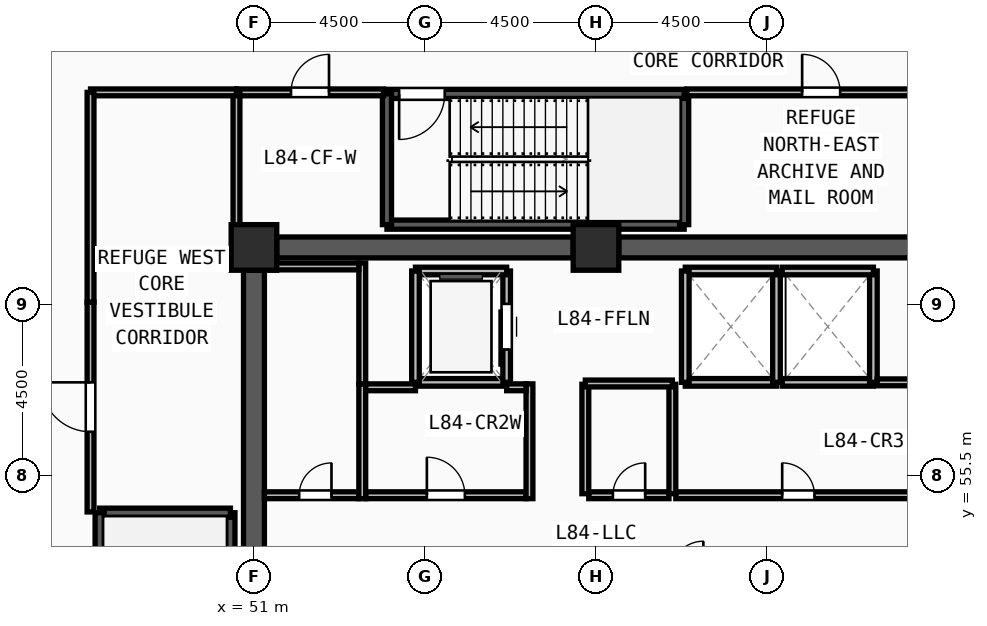
"""IFC4 building model, lengths in metres.
Left out: names, types, materials, properties, quantities, classifications, styles, units other than length and angle.
Written with IfcOpenShell. Run it as: python <this file> out.ifc"""

import sys

from ifc_helpers import new_model, si_unit, direction, frame, frame_2d, origin, origin_2d, place, context, subcontext, project, spatial, rectangle, extrude, source, transform, mapped, element, fill, save


model = new_model("IFC4")
c1 = context("Model", 3, precision=1e-05, world=origin(), true_north=direction((0.0, 1.0)))
c2 = subcontext(c1, "Body", "Model", "MODEL_VIEW")
j1 = project(units=[si_unit("LENGTHUNIT", "METRE"), si_unit("PLANEANGLEUNIT", "RADIAN")], contexts=[c1])
p1 = place(None, origin())
s1 = spatial("IfcSite", under=j1, at=p1, CompositionType="ELEMENT")
p2 = place(p1, origin())
s2 = spatial("IfcBuilding", under=s1, at=p2, CompositionType="ELEMENT")
p3 = place(p2, frame((0.0, 0.0, 324.0)))
s3 = spatial("IfcBuildingStorey", under=s2, at=p3, CompositionType="ELEMENT", Elevation=324.0)
m1 = source(origin(), c2, "Body", "SweptSolid", [
    extrude(rectangle(XDim=1.2, YDim=1.2, at=origin_2d()), origin(), (0.0, 0.0, 1.0), 4.5),
])
for number, where, z_axis, x_axis in (
    (1, (60.0, 61.5, 0.0), (0.0, 0.0, 1.0), (1.0, 0.0, 0.0)),
    (2, (51.0, 61.5, 0.0), (0.0, 0.0, 1.0), (1.0, 0.0, 0.0)),
):
    element("IfcColumn", number, at=place(p3, frame(where, z_axis=z_axis, x_axis=x_axis)), inside=s3, PredefinedType="COLUMN", context=c2, shape_type="MappedRepresentation", body=[
        mapped(m1, transform((0.0, 0.0, 0.0), x_axis=(1.0, 0.0, 0.0), y_axis=(0.0, 1.0, 0.0), z_axis=(0.0, 0.0, 1.0), scale=1.0)),
    ])
for number, where, z_axis, x_axis in (
    (3, (51.6, 61.5, 0.0), (0.0, 0.0, 1.0), (1.0, 0.0, 0.0)),
    (4, (60.6, 61.5, 0.0), (0.0, 0.0, 1.0), (1.0, 0.0, 0.0)),
):
    element("IfcWall", number, at=place(p3, frame(where, z_axis=z_axis, x_axis=x_axis)), inside=s3, PredefinedType="SHEAR", context=c2, shape_type="SweptSolid", body=[
        extrude(rectangle(XDim=7.8, YDim=0.55, at=frame_2d((3.9, 0.0))), origin(), (0.0, 0.0, 1.0), 4.32),
    ])
p4 = place(p3, frame((51.0, 47.1, 0.0), z_axis=(0.0, 0.0, 1.0), x_axis=(0.0, 1.0, 0.0)))
e5 = element("IfcWall", 5, at=p4, inside=s3, PredefinedType="SHEAR", context=c2, shape_type="SweptSolid", body=[
    extrude(rectangle(XDim=13.8, YDim=0.55, at=frame_2d((6.9, 0.0))), origin(), (0.0, 0.0, 1.0), 4.32),
])
p5 = place(p3, frame((50.38, 46.7, 0.0), z_axis=(0.0, 0.0, 1.0), x_axis=(0.0, 1.0, 0.0)))
e6 = element("IfcWall", 6, at=p5, inside=s3, PredefinedType="SOLIDWALL", context=c2, shape_type="SweptSolid", body=[
    extrude(rectangle(XDim=7.82, YDim=0.24, at=frame_2d((3.91, 0.0))), origin(), (0.0, 0.0, 1.0), 4.32),
])
p6 = place(p3, frame((50.38, 54.52, 0.0), z_axis=(0.0, 0.0, 1.0), x_axis=(-1.0, 0.0, 0.0)))
e7 = element("IfcWall", 7, at=p6, inside=s3, PredefinedType="SOLIDWALL", context=c2, shape_type="SweptSolid", body=[
    extrude(rectangle(XDim=3.44, YDim=0.24, at=frame_2d((1.72, 0.0))), origin(), (0.0, 0.0, 1.0), 4.32),
])
p7 = place(p3, frame((46.94, 54.52, 0.0), z_axis=(0.0, 0.0, 1.0), x_axis=(0.0, -1.0, 0.0)))
e8 = element("IfcWall", 8, at=p7, inside=s3, PredefinedType="SOLIDWALL", context=c2, shape_type="SweptSolid", body=[
    extrude(rectangle(XDim=7.82, YDim=0.24, at=frame_2d((3.91, 0.0))), origin(), (0.0, 0.0, 1.0), 4.32),
])
m2 = source(origin(), c2, "Body", "SweptSolid", [
    extrude(rectangle(XDim=1.2, YDim=2.2, at=frame_2d((0.6, 1.1))), frame((0.0, 0.13, 0.0), z_axis=(0.0, -1.0, 0.0), x_axis=(1.0, 0.0, 0.0)), (0.0, 0.0, 1.0), 0.26),
])
p8 = place(p7, frame((6.3, 0.0, 0.0)))
e9 = element("IfcOpeningElement", 9, at=p8, cuts=e8, PredefinedType="OPENING", context=c2, shape_type="MappedRepresentation", body=[
    mapped(m2, transform((0.0, 0.0, 0.0), x_axis=(1.0, 0.0, 0.0), y_axis=(0.0, 1.0, 0.0), z_axis=(0.0, 0.0, 1.0), scale=1.0)),
])
p9 = place(p3, frame((54.5, 62.1, 0.0), z_axis=(0.0, 0.0, 1.0), x_axis=(1.0, 0.0, 0.0)))
e10 = element("IfcWall", 10, at=p9, inside=s3, PredefinedType="SOLIDWALL", context=c2, shape_type="SweptSolid", body=[
    extrude(rectangle(XDim=7.82, YDim=0.24, at=frame_2d((3.91, 0.0))), origin(), (0.0, 0.0, 1.0), 4.32),
])
p10 = place(p3, frame((62.32, 62.1, 0.0), z_axis=(0.0, 0.0, 1.0), x_axis=(0.0, 1.0, 0.0)))
e11 = element("IfcWall", 11, at=p10, inside=s3, PredefinedType="SOLIDWALL", context=c2, shape_type="SweptSolid", body=[
    extrude(rectangle(XDim=3.44, YDim=0.24, at=frame_2d((1.72, 0.0))), origin(), (0.0, 0.0, 1.0), 4.32),
])
p11 = place(p3, frame((62.32, 65.54, 0.0), z_axis=(0.0, 0.0, 1.0), x_axis=(-1.0, 0.0, 0.0)))
e12 = element("IfcWall", 12, at=p11, inside=s3, PredefinedType="SOLIDWALL", context=c2, shape_type="SweptSolid", body=[
    extrude(rectangle(XDim=7.82, YDim=0.24, at=frame_2d((3.91, 0.0))), origin(), (0.0, 0.0, 1.0), 4.32),
])
p12 = place(p11, frame((6.3, 0.0, 0.0)))
e13 = element("IfcOpeningElement", 13, at=p12, cuts=e12, PredefinedType="OPENING", context=c2, shape_type="MappedRepresentation", body=[
    mapped(m2, transform((0.0, 0.0, 0.0), x_axis=(1.0, 0.0, 0.0), y_axis=(0.0, 1.0, 0.0), z_axis=(0.0, 0.0, 1.0), scale=1.0)),
])
p13 = place(p3, frame((54.5, 65.54, 0.0), z_axis=(0.0, 0.0, 1.0), x_axis=(0.0, -1.0, 0.0)))
e14 = element("IfcWall", 14, at=p13, inside=s3, PredefinedType="SOLIDWALL", context=c2, shape_type="SweptSolid", body=[
    extrude(rectangle(XDim=3.44, YDim=0.24, at=frame_2d((1.72, 0.0))), origin(), (0.0, 0.0, 1.0), 4.32),
])
p14 = place(p3, frame((55.25, 57.95, 0.0), z_axis=(0.0, 0.0, 1.0), x_axis=(1.0, 0.0, 0.0)))
e15 = element("IfcWall", 15, at=p14, inside=s3, PredefinedType="SOLIDWALL", context=c2, shape_type="SweptSolid", body=[
    extrude(rectangle(XDim=2.4, YDim=0.2, at=frame_2d((1.2, 0.0))), origin(), (0.0, 0.0, 1.0), 4.32),
])
p15 = place(p3, frame((57.65, 57.95, 0.0), z_axis=(0.0, 0.0, 1.0), x_axis=(0.0, 1.0, 0.0)))
e16 = element("IfcWall", 16, at=p15, inside=s3, PredefinedType="SOLIDWALL", context=c2, shape_type="SweptSolid", body=[
    extrude(rectangle(XDim=2.93, YDim=0.2, at=frame_2d((1.465, 0.0))), origin(), (0.0, 0.0, 1.0), 4.32),
])
m3 = source(origin(), c2, "Body", "SweptSolid", [
    extrude(rectangle(XDim=1.2, YDim=2.3, at=frame_2d((0.6, 1.15))), frame((0.0, 0.11, 0.0), z_axis=(0.0, -1.0, 0.0), x_axis=(1.0, 0.0, 0.0)), (0.0, 0.0, 1.0), 0.22),
])
p16 = place(p15, frame((0.865, 0.0, 0.0)))
e17 = element("IfcOpeningElement", 17, at=p16, cuts=e16, PredefinedType="OPENING", context=c2, shape_type="MappedRepresentation", body=[
    mapped(m3, transform((0.0, 0.0, 0.0), x_axis=(1.0, 0.0, 0.0), y_axis=(0.0, 1.0, 0.0), z_axis=(0.0, 0.0, 1.0), scale=1.0)),
])
p17 = place(p3, frame((57.65, 60.88, 0.0), z_axis=(0.0, 0.0, 1.0), x_axis=(-1.0, 0.0, 0.0)))
e18 = element("IfcWall", 18, at=p17, inside=s3, PredefinedType="SOLIDWALL", context=c2, shape_type="SweptSolid", body=[
    extrude(rectangle(XDim=2.4, YDim=0.2, at=frame_2d((1.2, 0.0))), origin(), (0.0, 0.0, 1.0), 4.32),
])
p18 = place(p3, frame((55.25, 60.88, 0.0), z_axis=(0.0, 0.0, 1.0), x_axis=(0.0, -1.0, 0.0)))
e19 = element("IfcWall", 19, at=p18, inside=s3, PredefinedType="SOLIDWALL", context=c2, shape_type="SweptSolid", body=[
    extrude(rectangle(XDim=2.93, YDim=0.2, at=frame_2d((1.465, 0.0))), origin(), (0.0, 0.0, 1.0), 4.32),
])
p19 = place(p3, frame((62.35, 57.95, 0.0), z_axis=(0.0, 0.0, 1.0), x_axis=(1.0, 0.0, 0.0)))
e20 = element("IfcWall", 20, at=p19, inside=s3, PredefinedType="SOLIDWALL", context=c2, shape_type="SweptSolid", body=[
    extrude(rectangle(XDim=2.4, YDim=0.2, at=frame_2d((1.2, 0.0))), origin(), (0.0, 0.0, 1.0), 4.32),
])
p20 = place(p3, frame((64.75, 57.95, 0.0), z_axis=(0.0, 0.0, 1.0), x_axis=(0.0, 1.0, 0.0)))
e21 = element("IfcWall", 21, at=p20, inside=s3, PredefinedType="SOLIDWALL", context=c2, shape_type="SweptSolid", body=[
    extrude(rectangle(XDim=2.93, YDim=0.2, at=frame_2d((1.465, 0.0))), origin(), (0.0, 0.0, 1.0), 4.32),
])
p21 = place(p3, frame((64.75, 60.88, 0.0), z_axis=(0.0, 0.0, 1.0), x_axis=(-1.0, 0.0, 0.0)))
e22 = element("IfcWall", 22, at=p21, inside=s3, PredefinedType="SOLIDWALL", context=c2, shape_type="SweptSolid", body=[
    extrude(rectangle(XDim=2.4, YDim=0.2, at=frame_2d((1.2, 0.0))), origin(), (0.0, 0.0, 1.0), 4.32),
])
p22 = place(p3, frame((62.35, 60.88, 0.0), z_axis=(0.0, 0.0, 1.0), x_axis=(0.0, -1.0, 0.0)))
e23 = element("IfcWall", 23, at=p22, inside=s3, PredefinedType="SOLIDWALL", context=c2, shape_type="SweptSolid", body=[
    extrude(rectangle(XDim=2.93, YDim=0.2, at=frame_2d((1.465, 0.0))), origin(), (0.0, 0.0, 1.0), 4.32),
])
p23 = place(p3, frame((64.9, 57.95, 0.0), z_axis=(0.0, 0.0, 1.0), x_axis=(1.0, 0.0, 0.0)))
e24 = element("IfcWall", 24, at=p23, inside=s3, PredefinedType="SOLIDWALL", context=c2, shape_type="SweptSolid", body=[
    extrude(rectangle(XDim=2.4, YDim=0.2, at=frame_2d((1.2, 0.0))), origin(), (0.0, 0.0, 1.0), 4.32),
])
p24 = place(p3, frame((67.3, 57.95, 0.0), z_axis=(0.0, 0.0, 1.0), x_axis=(0.0, 1.0, 0.0)))
e25 = element("IfcWall", 25, at=p24, inside=s3, PredefinedType="SOLIDWALL", context=c2, shape_type="SweptSolid", body=[
    extrude(rectangle(XDim=2.93, YDim=0.2, at=frame_2d((1.465, 0.0))), origin(), (0.0, 0.0, 1.0), 4.32),
])
p25 = place(p3, frame((67.3, 60.88, 0.0), z_axis=(0.0, 0.0, 1.0), x_axis=(-1.0, 0.0, 0.0)))
e26 = element("IfcWall", 26, at=p25, inside=s3, PredefinedType="SOLIDWALL", context=c2, shape_type="SweptSolid", body=[
    extrude(rectangle(XDim=2.4, YDim=0.2, at=frame_2d((1.2, 0.0))), origin(), (0.0, 0.0, 1.0), 4.32),
])
p26 = place(p3, frame((53.94, 54.98, 0.0), z_axis=(0.0, 0.0, 1.0), x_axis=(1.0, 0.0, 0.0)))
e27 = element("IfcWall", 27, at=p26, inside=s3, PredefinedType="PARTITIONING", context=c2, shape_type="SweptSolid", body=[
    extrude(rectangle(XDim=4.22, YDim=0.18, at=frame_2d((2.11, 0.0))), origin(), (0.0, 0.0, 1.0), 4.32),
])
m4 = source(origin(), c2, "Body", "SweptSolid", [
    extrude(rectangle(XDim=1.0, YDim=2.2, at=frame_2d((0.5, 1.1))), frame((0.0, 0.1, 0.0), z_axis=(0.0, -1.0, 0.0), x_axis=(1.0, 0.0, 0.0)), (0.0, 0.0, 1.0), 0.2),
])
p27 = place(p26, frame((1.61, 0.0, 0.0)))
e28 = element("IfcOpeningElement", 28, at=p27, cuts=e27, PredefinedType="OPENING", context=c2, shape_type="MappedRepresentation", body=[
    mapped(m4, transform((0.0, 0.0, 0.0), x_axis=(1.0, 0.0, 0.0), y_axis=(0.0, 1.0, 0.0), z_axis=(0.0, 0.0, 1.0), scale=1.0)),
])
p28 = place(p3, frame((51.275, 54.98, 0.0), z_axis=(0.0, 0.0, 1.0), x_axis=(1.0, 0.0, 0.0)))
e29 = element("IfcWall", 29, at=p28, inside=s3, PredefinedType="PARTITIONING", context=c2, shape_type="SweptSolid", body=[
    extrude(rectangle(XDim=2.485, YDim=0.18, at=frame_2d((1.243, 0.0))), origin(), (0.0, 0.0, 1.0), 4.32),
])
m5 = source(origin(), c2, "Body", "SweptSolid", [
    extrude(rectangle(XDim=0.85, YDim=2.1, at=frame_2d((0.425, 1.05))), frame((0.0, 0.1, 0.0), z_axis=(0.0, -1.0, 0.0), x_axis=(1.0, 0.0, 0.0)), (0.0, 0.0, 1.0), 0.2),
])
p29 = place(p28, frame((0.915, 0.0, 0.0)))
e30 = element("IfcOpeningElement", 30, at=p29, cuts=e29, PredefinedType="OPENING", context=c2, shape_type="MappedRepresentation", body=[
    mapped(m5, transform((0.0, 0.0, 0.0), x_axis=(1.0, 0.0, 0.0), y_axis=(0.0, 1.0, 0.0), z_axis=(0.0, 0.0, 1.0), scale=1.0)),
])
p30 = place(p3, frame((62.1, 54.98, 0.0), z_axis=(0.0, 0.0, 1.0), x_axis=(1.0, 0.0, 0.0)))
e31 = element("IfcWall", 31, at=p30, inside=s3, PredefinedType="PARTITIONING", context=c2, shape_type="SweptSolid", body=[
    extrude(rectangle(XDim=6.625, YDim=0.18, at=frame_2d((3.312, 0.0))), origin(), (0.0, 0.0, 1.0), 4.32),
])
p31 = place(p30, frame((2.8, 0.0, 0.0)))
e32 = element("IfcOpeningElement", 32, at=p31, cuts=e31, PredefinedType="OPENING", context=c2, shape_type="MappedRepresentation", body=[
    mapped(m5, transform((0.0, 0.0, 0.0), x_axis=(1.0, 0.0, 0.0), y_axis=(0.0, 1.0, 0.0), z_axis=(0.0, 0.0, 1.0), scale=1.0)),
])
p32 = place(p3, frame((59.81, 54.98, 0.0), z_axis=(0.0, 0.0, 1.0), x_axis=(1.0, 0.0, 0.0)))
e33 = element("IfcWall", 33, at=p32, inside=s3, PredefinedType="PARTITIONING", context=c2, shape_type="SweptSolid", body=[
    extrude(rectangle(XDim=2.11, YDim=0.18, at=frame_2d((1.055, 0.0))), origin(), (0.0, 0.0, 1.0), 4.32),
])
p33 = place(p32, frame((0.635, 0.0, 0.0)))
e34 = element("IfcOpeningElement", 34, at=p33, cuts=e33, PredefinedType="OPENING", context=c2, shape_type="MappedRepresentation", body=[
    mapped(m5, transform((0.0, 0.0, 0.0), x_axis=(1.0, 0.0, 0.0), y_axis=(0.0, 1.0, 0.0), z_axis=(0.0, 0.0, 1.0), scale=1.0)),
])
p34 = place(p3, frame((50.54, 65.58, 0.0), z_axis=(0.0, 0.0, 1.0), x_axis=(1.0, 0.0, 0.0)))
e35 = element("IfcWall", 35, at=p34, inside=s3, PredefinedType="PARTITIONING", context=c2, shape_type="SweptSolid", body=[
    extrude(rectangle(XDim=3.87, YDim=0.18, at=frame_2d((1.935, 0.0))), origin(), (0.0, 0.0, 1.0), 4.32),
])
p35 = place(p34, frame((1.435, 0.0, 0.0)))
e36 = element("IfcOpeningElement", 36, at=p35, cuts=e35, PredefinedType="OPENING", context=c2, shape_type="MappedRepresentation", body=[
    mapped(m4, transform((0.0, 0.0, 0.0), x_axis=(1.0, 0.0, 0.0), y_axis=(0.0, 1.0, 0.0), z_axis=(0.0, 0.0, 1.0), scale=1.0)),
])
p36 = place(p3, frame((62.39, 65.58, 0.0), z_axis=(0.0, 0.0, 1.0), x_axis=(1.0, 0.0, 0.0)))
e37 = element("IfcWall", 37, at=p36, inside=s3, PredefinedType="PARTITIONING", context=c2, shape_type="SweptSolid", body=[
    extrude(rectangle(XDim=7.07, YDim=0.18, at=frame_2d((3.535, 0.0))), origin(), (0.0, 0.0, 1.0), 4.32),
])
p37 = place(p36, frame((3.035, 0.0, 0.0)))
e38 = element("IfcOpeningElement", 38, at=p37, cuts=e37, PredefinedType="OPENING", context=c2, shape_type="MappedRepresentation", body=[
    mapped(m4, transform((0.0, 0.0, 0.0), x_axis=(1.0, 0.0, 0.0), y_axis=(0.0, 1.0, 0.0), z_axis=(0.0, 0.0, 1.0), scale=1.0)),
])
p38 = place(p3, frame((46.7, 54.54, 0.0), z_axis=(0.0, 0.0, 1.0), x_axis=(0.0, 1.0, 0.0)))
e39 = element("IfcWall", 39, at=p38, inside=s3, PredefinedType="PARTITIONING", context=c2, shape_type="SweptSolid", body=[
    extrude(rectangle(XDim=5.52, YDim=0.18, at=frame_2d((2.76, 0.0))), origin(), (0.0, 0.0, 1.0), 4.32),
])
m6 = source(origin(), c2, "Body", "SweptSolid", [
    extrude(rectangle(XDim=1.3, YDim=2.2, at=frame_2d((0.65, 1.1))), frame((0.0, 0.1, 0.0), z_axis=(0.0, -1.0, 0.0), x_axis=(1.0, 0.0, 0.0)), (0.0, 0.0, 1.0), 0.2),
])
p39 = place(p38, frame((2.11, 0.0, 0.0)))
e40 = element("IfcOpeningElement", 40, at=p39, cuts=e39, PredefinedType="OPENING", context=c2, shape_type="MappedRepresentation", body=[
    mapped(m6, transform((0.0, 0.0, 0.0), x_axis=(1.0, 0.0, 0.0), y_axis=(0.0, 1.0, 0.0), z_axis=(0.0, 0.0, 1.0), scale=1.0)),
])
for number, where, z_axis, x_axis in (
    (41, (59.72, 55.02, 0.0), (0.0, 0.0, 1.0), (0.0, 1.0, 0.0)),
    (42, (62.01, 55.02, 0.0), (0.0, 0.0, 1.0), (0.0, 1.0, 0.0)),
):
    element("IfcWall", number, at=place(p3, frame(where, z_axis=z_axis, x_axis=x_axis)), inside=s3, PredefinedType="PARTITIONING", context=c2, shape_type="SweptSolid", body=[
        extrude(rectangle(XDim=2.88, YDim=0.18, at=frame_2d((1.44, 0.0))), origin(), (0.0, 0.0, 1.0), 4.32),
    ])
p40 = place(p3, frame((59.72, 57.92, 0.0), z_axis=(0.0, 0.0, 1.0), x_axis=(1.0, 0.0, 0.0)))
e43 = element("IfcWall", 43, at=p40, inside=s3, PredefinedType="PARTITIONING", context=c2, shape_type="SweptSolid", body=[
    extrude(rectangle(XDim=2.29, YDim=0.18, at=frame_2d((1.145, 0.0))), origin(), (0.0, 0.0, 1.0), 4.32),
])
p41 = place(p3, frame((50.54, 61.95, 0.0), z_axis=(0.0, 0.0, 1.0), x_axis=(0.0, 1.0, 0.0)))
e44 = element("IfcWall", 44, at=p41, inside=s3, PredefinedType="PARTITIONING", context=c2, shape_type="SweptSolid", body=[
    extrude(rectangle(XDim=3.63, YDim=0.18, at=frame_2d((1.815, 0.0))), origin(), (0.0, 0.0, 1.0), 4.32),
])
p42 = place(p3, frame((46.7, 65.58, 0.0), z_axis=(0.0, 0.0, 1.0), x_axis=(1.0, 0.0, 0.0)))
e45 = element("IfcWall", 45, at=p42, inside=s3, PredefinedType="PARTITIONING", context=c2, shape_type="SweptSolid", body=[
    extrude(rectangle(XDim=3.84, YDim=0.18, at=frame_2d((1.92, 0.0))), origin(), (0.0, 0.0, 1.0), 4.32),
])
p43 = place(p3, frame((46.7, 60.06, 0.0), z_axis=(0.0, 0.0, 1.0), x_axis=(0.0, 1.0, 0.0)))
e46 = element("IfcWall", 46, at=p43, inside=s3, PredefinedType="PARTITIONING", context=c2, shape_type="SweptSolid", body=[
    extrude(rectangle(XDim=5.52, YDim=0.18, at=frame_2d((2.76, 0.0))), origin(), (0.0, 0.0, 1.0), 4.32),
])
for number, where, z_axis, x_axis in (
    (47, (53.85, 54.89, 0.0), (0.0, 0.0, 1.0), (0.0, 1.0, 0.0)),
    (48, (58.25, 54.89, 0.0), (0.0, 0.0, 1.0), (0.0, 1.0, 0.0)),
):
    element("IfcWall", number, at=place(p3, frame(where, z_axis=z_axis, x_axis=x_axis)), inside=s3, PredefinedType="PARTITIONING", context=c2, shape_type="SweptSolid", body=[
        extrude(rectangle(XDim=3.02, YDim=0.18, at=frame_2d((1.51, 0.0))), origin(), (0.0, 0.0, 1.0), 4.32),
    ])
p44 = place(p3, frame((53.94, 57.82, 0.0), z_axis=(0.0, 0.0, 1.0), x_axis=(1.0, 0.0, 0.0)))
e49 = element("IfcWall", 49, at=p44, inside=s3, PredefinedType="PARTITIONING", context=c2, shape_type="SweptSolid", body=[
    extrude(rectangle(XDim=1.31, YDim=0.18, at=frame_2d((0.655, 0.0))), origin(), (0.0, 0.0, 1.0), 4.32),
])
p45 = place(p3, frame((57.65, 57.82, 0.0), z_axis=(0.0, 0.0, 1.0), x_axis=(1.0, 0.0, 0.0)))
e50 = element("IfcWall", 50, at=p45, inside=s3, PredefinedType="PARTITIONING", context=c2, shape_type="SweptSolid", body=[
    extrude(rectangle(XDim=0.51, YDim=0.18, at=frame_2d((0.255, 0.0))), origin(), (0.0, 0.0, 1.0), 4.32),
])
p46 = place(p3, frame((53.85, 57.91, 0.0), z_axis=(0.0, 0.0, 1.0), x_axis=(0.0, 1.0, 0.0)))
e51 = element("IfcWall", 51, at=p46, inside=s3, PredefinedType="PARTITIONING", context=c2, shape_type="SweptSolid", body=[
    extrude(rectangle(XDim=3.18, YDim=0.18, at=frame_2d((1.59, 0.0))), origin(), (0.0, 0.0, 1.0), 4.32),
])
p47 = place(p3, frame((51.437, 61.0, 0.0), z_axis=(0.0, 0.0, 1.0), x_axis=(1.0, 0.0, 0.0)))
e52 = element("IfcWall", 52, at=p47, inside=s3, PredefinedType="PARTITIONING", context=c2, shape_type="SweptSolid", body=[
    extrude(rectangle(XDim=2.323, YDim=0.18, at=frame_2d((1.162, 0.0))), origin(), (0.0, 0.0, 1.0), 4.32),
])
p48 = place(p3, frame((67.4, 57.95, 0.0), z_axis=(0.0, 0.0, 1.0), x_axis=(1.0, 0.0, 0.0)))
e53 = element("IfcWall", 53, at=p48, inside=s3, PredefinedType="PARTITIONING", context=c2, shape_type="SweptSolid", body=[
    extrude(rectangle(XDim=1.325, YDim=0.18, at=frame_2d((0.663, 0.0))), origin(), (0.0, 0.0, 1.0), 4.32),
])
m7 = source(origin(), c2, "Body", "SweptSolid", [
    extrude(rectangle(XDim=1.2, YDim=2.2, at=frame_2d((0.6, 1.1))), frame((0.0, 0.025, 0.0), z_axis=(0.0, -1.0, 0.0), x_axis=(1.0, 0.0, 0.0)), (0.0, 0.0, 1.0), 0.05),
])
p49 = place(p12, origin())
e54 = element("IfcDoor", 54, at=p49, inside=s3, OperationType="SINGLE_SWING_RIGHT", PredefinedType="DOOR", context=c2, shape_type="MappedRepresentation", body=[
    mapped(m7, transform((0.0, 0.0, 0.0), x_axis=(1.0, 0.0, 0.0), y_axis=(0.0, 1.0, 0.0), z_axis=(0.0, 0.0, 1.0), scale=1.0)),
])
fill(e13, e54)
m8 = source(origin(), c2, "Body", "SweptSolid", [
    extrude(rectangle(XDim=1.2, YDim=2.3, at=frame_2d((0.6, 1.15))), frame((0.0, 0.025, 0.0), z_axis=(0.0, -1.0, 0.0), x_axis=(1.0, 0.0, 0.0)), (0.0, 0.0, 1.0), 0.05),
])
p50 = place(p16, origin())
e55 = element("IfcDoor", 55, at=p50, inside=s3, OperationType="SLIDING_TO_LEFT", PredefinedType="DOOR", context=c2, shape_type="MappedRepresentation", body=[
    mapped(m8, transform((0.0, 0.0, 0.0), x_axis=(1.0, 0.0, 0.0), y_axis=(0.0, 1.0, 0.0), z_axis=(0.0, 0.0, 1.0), scale=1.0)),
])
fill(e17, e55)
m9 = source(origin(), c2, "Body", "SweptSolid", [
    extrude(rectangle(XDim=1.0, YDim=2.2, at=frame_2d((0.5, 1.1))), frame((0.0, 0.025, 0.0), z_axis=(0.0, -1.0, 0.0), x_axis=(1.0, 0.0, 0.0)), (0.0, 0.0, 1.0), 0.05),
])
p51 = place(p27, origin())
e56 = element("IfcDoor", 56, at=p51, inside=s3, OperationType="SINGLE_SWING_LEFT", PredefinedType="DOOR", context=c2, shape_type="MappedRepresentation", body=[
    mapped(m9, transform((0.0, 0.0, 0.0), x_axis=(1.0, 0.0, 0.0), y_axis=(0.0, 1.0, 0.0), z_axis=(0.0, 0.0, 1.0), scale=1.0)),
])
fill(e28, e56)
m10 = source(origin(), c2, "Body", "SweptSolid", [
    extrude(rectangle(XDim=0.85, YDim=2.1, at=frame_2d((0.425, 1.05))), frame((0.0, 0.025, 0.0), z_axis=(0.0, -1.0, 0.0), x_axis=(1.0, 0.0, 0.0)), (0.0, 0.0, 1.0), 0.05),
])
p52 = place(p29, origin())
e57 = element("IfcDoor", 57, at=p52, inside=s3, OperationType="SINGLE_SWING_RIGHT", PredefinedType="DOOR", context=c2, shape_type="MappedRepresentation", body=[
    mapped(m10, transform((0.0, 0.0, 0.0), x_axis=(1.0, 0.0, 0.0), y_axis=(0.0, 1.0, 0.0), z_axis=(0.0, 0.0, 1.0), scale=1.0)),
])
fill(e30, e57)
p53 = place(p31, origin())
e58 = element("IfcDoor", 58, at=p53, inside=s3, OperationType="SINGLE_SWING_LEFT", PredefinedType="DOOR", context=c2, shape_type="MappedRepresentation", body=[
    mapped(m10, transform((0.0, 0.0, 0.0), x_axis=(1.0, 0.0, 0.0), y_axis=(0.0, 1.0, 0.0), z_axis=(0.0, 0.0, 1.0), scale=1.0)),
])
fill(e32, e58)
p54 = place(p33, origin())
e59 = element("IfcDoor", 59, at=p54, inside=s3, OperationType="SINGLE_SWING_RIGHT", PredefinedType="DOOR", context=c2, shape_type="MappedRepresentation", body=[
    mapped(m10, transform((0.0, 0.0, 0.0), x_axis=(1.0, 0.0, 0.0), y_axis=(0.0, 1.0, 0.0), z_axis=(0.0, 0.0, 1.0), scale=1.0)),
])
fill(e34, e59)
p55 = place(p35, origin())
e60 = element("IfcDoor", 60, at=p55, inside=s3, OperationType="SINGLE_SWING_RIGHT", PredefinedType="DOOR", context=c2, shape_type="MappedRepresentation", body=[
    mapped(m9, transform((0.0, 0.0, 0.0), x_axis=(1.0, 0.0, 0.0), y_axis=(0.0, 1.0, 0.0), z_axis=(0.0, 0.0, 1.0), scale=1.0)),
])
fill(e36, e60)
p56 = place(p37, origin())
e61 = element("IfcDoor", 61, at=p56, inside=s3, OperationType="SINGLE_SWING_LEFT", PredefinedType="DOOR", context=c2, shape_type="MappedRepresentation", body=[
    mapped(m9, transform((0.0, 0.0, 0.0), x_axis=(1.0, 0.0, 0.0), y_axis=(0.0, 1.0, 0.0), z_axis=(0.0, 0.0, 1.0), scale=1.0)),
])
fill(e38, e61)
m11 = source(origin(), c2, "Body", "SweptSolid", [
    extrude(rectangle(XDim=1.3, YDim=2.2, at=frame_2d((0.65, 1.1))), frame((0.0, 0.025, 0.0), z_axis=(0.0, -1.0, 0.0), x_axis=(1.0, 0.0, 0.0)), (0.0, 0.0, 1.0), 0.05),
])
p57 = place(p39, origin())
e62 = element("IfcDoor", 62, at=p57, inside=s3, OperationType="SINGLE_SWING_RIGHT", PredefinedType="DOOR", context=c2, shape_type="MappedRepresentation", body=[
    mapped(m11, transform((0.0, 0.0, 0.0), x_axis=(1.0, 0.0, 0.0), y_axis=(0.0, 1.0, 0.0), z_axis=(0.0, 0.0, 1.0), scale=1.0)),
])
fill(e40, e62)
save(model, sys.argv[1])
